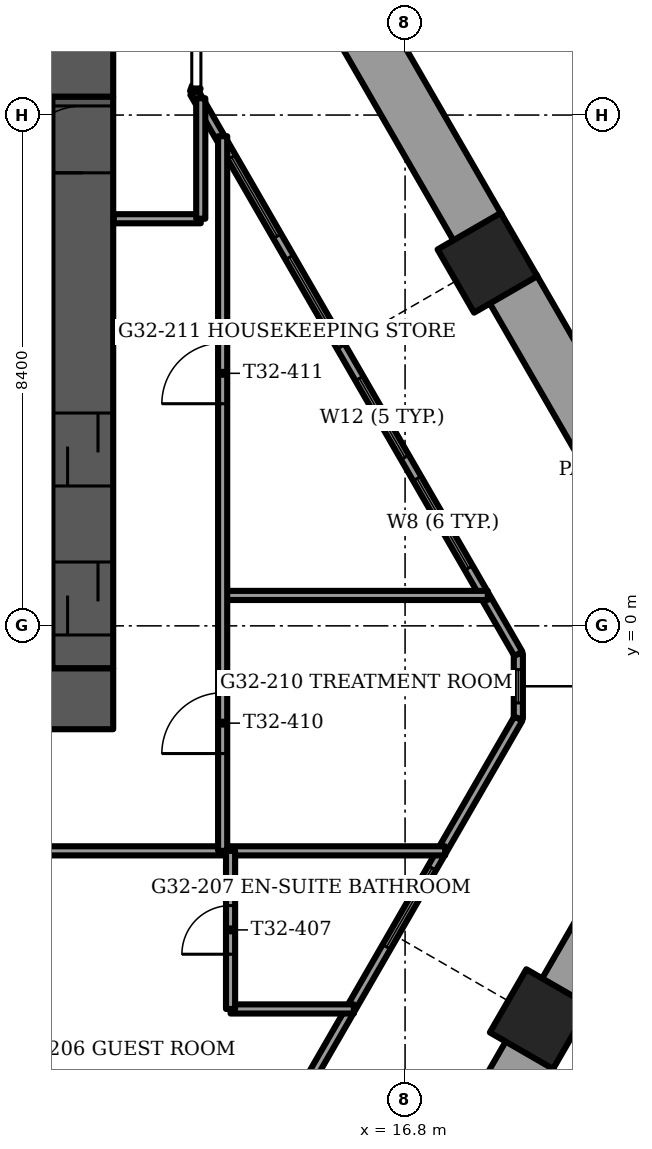
"""IFC4 building model, lengths in metres.
Left out: names, types, materials, properties, quantities, classifications, styles, units other than length and angle.
Written with IfcOpenShell. Run it as: python <this file> out.ifc"""

import sys

from ifc_helpers import new_model, si_unit, direction, frame, frame_2d, origin, origin_2d, place, context, subcontext, project, spatial, rectangle, extrude, element, fill, save


model = new_model("IFC4")
c1 = context("Model", 3, precision=1e-05, world=origin(), true_north=direction((0.0, 1.0)))
c2 = subcontext(c1, "Body", "Model", "MODEL_VIEW")
j1 = project(units=[si_unit("LENGTHUNIT", "METRE"), si_unit("PLANEANGLEUNIT", "RADIAN")], contexts=[c1])
p1 = place(None, origin())
s1 = spatial("IfcSite", under=j1, at=p1, CompositionType="ELEMENT")
p2 = place(p1, origin())
s2 = spatial("IfcBuilding", under=s1, at=p2, CompositionType="ELEMENT")
p3 = place(p2, frame((0.0, 0.0, 131.0)))
s3 = spatial("IfcBuildingStorey", under=s2, at=p3, CompositionType="ELEMENT", Elevation=131.0)
for number, where, z_axis, x_axis in (
    (1, (19.014, -6.467, -1.2), (0.0, 0.0, 1.0), (-0.5, -0.866, 0.0)),
    (2, (18.154, 5.97, -1.2), (0.0, 0.0, 1.0), (0.5, -0.866, 0.0)),
):
    element("IfcColumn", number, at=place(p3, frame(where, z_axis=z_axis, x_axis=x_axis)), inside=s3, PredefinedType="COLUMN", context=c2, shape_type="SweptSolid", body=[
        extrude(rectangle(XDim=1.2, YDim=1.2, at=origin_2d()), origin(), (0.0, 0.0, 1.0), 3.75),
    ])
p4 = place(p3, frame((-12.0, -1.2, -0.3), z_axis=(0.0, 0.0, 1.0), x_axis=(1.0, 0.0, 0.0)))
e3 = element("IfcWall", 3, at=p4, inside=s3, PredefinedType="SHEAR", context=c2, shape_type="SweptSolid", body=[
    extrude(rectangle(XDim=24.0, YDim=1.0, at=frame_2d((12.0, 0.0))), origin(), (0.0, 0.0, 1.0), 3.75),
])
p5 = place(p4, frame((11.2, 0.0, 0.0)))
e4 = element("IfcOpeningElement", 4, at=p5, cuts=e3, PredefinedType="OPENING", context=c2, shape_type="SweptSolid", body=[
    extrude(rectangle(XDim=1.6, YDim=2.1, at=frame_2d((0.8, 1.05))), frame((0.0, 0.5, 0.0), z_axis=(0.0, -1.0, 0.0), x_axis=(1.0, 0.0, 0.0)), (0.0, 0.0, 1.0), 1.0),
])
p6 = place(p3, frame((-12.0, 9.2, -0.3), z_axis=(0.0, 0.0, 1.0), x_axis=(1.0, 0.0, 0.0)))
e5 = element("IfcWall", 5, at=p6, inside=s3, PredefinedType="SHEAR", context=c2, shape_type="SweptSolid", body=[
    extrude(rectangle(XDim=24.0, YDim=1.0, at=frame_2d((12.0, 0.0))), origin(), (0.0, 0.0, 1.0), 3.75),
])
p7 = place(p6, frame((11.2, 0.0, 0.0)))
e6 = element("IfcOpeningElement", 6, at=p7, cuts=e5, PredefinedType="OPENING", context=c2, shape_type="SweptSolid", body=[
    extrude(rectangle(XDim=1.6, YDim=2.1, at=frame_2d((0.8, 1.05))), frame((0.0, 0.5, 0.0), z_axis=(0.0, -1.0, 0.0), x_axis=(1.0, 0.0, 0.0)), (0.0, 0.0, 1.0), 1.0),
])
p8 = place(p6, frame((5.25, 0.0, 0.0)))
e7 = element("IfcOpeningElement", 7, at=p8, cuts=e5, PredefinedType="OPENING", context=c2, shape_type="SweptSolid", body=[
    extrude(rectangle(XDim=1.1, YDim=2.1, at=frame_2d((0.55, 1.05))), frame((0.0, 0.5, 0.0), z_axis=(0.0, -1.0, 0.0), x_axis=(1.0, 0.0, 0.0)), (0.0, 0.0, 1.0), 1.0),
])
p9 = place(p6, frame((17.65, 0.0, 0.0)))
e8 = element("IfcOpeningElement", 8, at=p9, cuts=e5, PredefinedType="OPENING", context=c2, shape_type="SweptSolid", body=[
    extrude(rectangle(XDim=1.1, YDim=2.1, at=frame_2d((0.55, 1.05))), frame((0.0, 0.5, 0.0), z_axis=(0.0, -1.0, 0.0), x_axis=(1.0, 0.0, 0.0)), (0.0, 0.0, 1.0), 1.0),
])
p10 = place(p3, frame((11.5, -0.7, -0.3), z_axis=(0.0, 0.0, 1.0), x_axis=(0.0, 1.0, 0.0)))
e9 = element("IfcWall", 9, at=p10, inside=s3, PredefinedType="SHEAR", context=c2, shape_type="SweptSolid", body=[
    extrude(rectangle(XDim=9.4, YDim=1.0, at=frame_2d((4.7, 0.0))), origin(), (0.0, 0.0, 1.0), 3.75),
])
p11 = place(p10, frame((8.15, 0.0, 0.0)))
e10 = element("IfcOpeningElement", 10, at=p11, cuts=e9, PredefinedType="OPENING", context=c2, shape_type="SweptSolid", body=[
    extrude(rectangle(XDim=1.1, YDim=2.1, at=frame_2d((0.55, 1.05))), frame((0.0, 0.5, 0.0), z_axis=(0.0, -1.0, 0.0), x_axis=(1.0, 0.0, 0.0)), (0.0, 0.0, 1.0), 1.0),
])
p12 = place(p10, frame((0.55, 0.0, 0.0)))
e11 = element("IfcOpeningElement", 11, at=p12, cuts=e9, PredefinedType="OPENING", context=c2, shape_type="SweptSolid", body=[
    extrude(rectangle(XDim=1.2, YDim=2.1, at=frame_2d((0.6, 1.05))), frame((0.0, 0.5, 0.0), z_axis=(0.0, -1.0, 0.0), x_axis=(1.0, 0.0, 0.0)), (0.0, 0.0, 1.0), 1.0),
])
p13 = place(p10, frame((3.0, 0.0, 0.0)))
e12 = element("IfcOpeningElement", 12, at=p13, cuts=e9, PredefinedType="OPENING", context=c2, shape_type="SweptSolid", body=[
    extrude(rectangle(XDim=1.2, YDim=2.1, at=frame_2d((0.6, 1.05))), frame((0.0, 0.5, 0.0), z_axis=(0.0, -1.0, 0.0), x_axis=(1.0, 0.0, 0.0)), (0.0, 0.0, 1.0), 1.0),
])
p14 = place(p3, frame((15.522, -12.815, 0.0), z_axis=(0.0, 0.0, 1.0), x_axis=(0.499999023957, 0.866025967302, 0.0)))
e13 = element("IfcWall", 13, at=p14, inside=s3, PredefinedType="PARAPET", context=c2, shape_type="SweptSolid", body=[
    extrude(rectangle(XDim=6.673, YDim=0.9, at=frame_2d((3.337, 0.0))), origin(), (0.0, 0.0, 1.0), 1.1),
])
p15 = place(p3, frame((19.429, -6.048, 0.0), z_axis=(0.0, 0.0, 1.0), x_axis=(0.499996813733, 0.866027243369, 0.0)))
e14 = element("IfcWall", 14, at=p15, inside=s3, PredefinedType="PARAPET", context=c2, shape_type="SweptSolid", body=[
    extrude(rectangle(XDim=5.187, YDim=0.9, at=frame_2d((2.593, 0.0))), origin(), (0.0, 0.0, 1.0), 1.1),
])
p16 = place(p3, frame((22.022, -0.429, 0.0), z_axis=(0.0, 0.0, 1.0), x_axis=(-0.500017246033, 0.866015446554, 0.0)))
e15 = element("IfcWall", 15, at=p16, inside=s3, PredefinedType="PARAPET", context=c2, shape_type="SweptSolid", body=[
    extrude(rectangle(XDim=6.906, YDim=0.9, at=frame_2d((3.453, 0.0))), origin(), (0.0, 0.0, 1.0), 1.1),
])
p17 = place(p3, frame((17.999, 6.539, 0.0), z_axis=(0.0, 0.0, 1.0), x_axis=(-0.50001062018, 0.866019272134, 0.0)))
e16 = element("IfcWall", 16, at=p17, inside=s3, PredefinedType="PARAPET", context=c2, shape_type="SweptSolid", body=[
    extrude(rectangle(XDim=6.674, YDim=0.9, at=frame_2d((3.337, 0.0))), origin(), (0.0, 0.0, 1.0), 1.1),
])
p18 = place(p3, frame((13.334, -10.755, 0.0), z_axis=(0.0, 0.0, 1.0), x_axis=(0.499997430087, 0.866026887519, 0.0)))
e17 = element("IfcWall", 17, at=p18, inside=s3, PredefinedType="SOLIDWALL", context=c2, shape_type="SweptSolid", body=[
    extrude(rectangle(XDim=10.657, YDim=0.15, at=frame_2d((5.329, 0.0))), origin(), (0.0, 0.0, 1.0), 3.45),
])
p19 = place(p18, frame((0.847, 0.0, 0.15)))
e18 = element("IfcOpeningElement", 18, at=p19, cuts=e17, PredefinedType="OPENING", context=c2, shape_type="SweptSolid", body=[
    extrude(rectangle(XDim=1.7, YDim=2.2, at=frame_2d((0.85, 1.1))), frame((0.0, 0.075, 0.0), z_axis=(0.0, -1.0, 0.0), x_axis=(1.0, 0.0, 0.0)), (0.0, 0.0, 1.0), 0.15),
])
p20 = place(p18, frame((6.322, 0.0, 0.15)))
e19 = element("IfcOpeningElement", 19, at=p20, cuts=e17, PredefinedType="OPENING", context=c2, shape_type="SweptSolid", body=[
    extrude(rectangle(XDim=1.5, YDim=2.2, at=frame_2d((0.75, 1.1))), frame((0.0, 0.075, 0.0), z_axis=(0.0, -1.0, 0.0), x_axis=(1.0, 0.0, 0.0)), (0.0, 0.0, 1.0), 0.15),
])
p21 = place(p3, frame((18.663, -0.46, 0.0), z_axis=(0.0, 0.0, 1.0), x_axis=(-0.499997430087, 0.866026887519, 0.0)))
e20 = element("IfcWall", 20, at=p21, inside=s3, PredefinedType="SOLIDWALL", context=c2, shape_type="SweptSolid", body=[
    extrude(rectangle(XDim=10.657, YDim=0.15, at=frame_2d((5.329, 0.0))), origin(), (0.0, 0.0, 1.0), 3.45),
])
p22 = place(p21, frame((1.63, 0.0, 0.15)))
e21 = element("IfcOpeningElement", 21, at=p22, cuts=e20, PredefinedType="OPENING", context=c2, shape_type="SweptSolid", body=[
    extrude(rectangle(XDim=1.7, YDim=2.2, at=frame_2d((0.85, 1.1))), frame((0.0, 0.075, 0.0), z_axis=(0.0, -1.0, 0.0), x_axis=(1.0, 0.0, 0.0)), (0.0, 0.0, 1.0), 0.15),
])
p23 = place(p21, frame((3.73, 0.0, 0.15)))
e22 = element("IfcOpeningElement", 22, at=p23, cuts=e20, PredefinedType="OPENING", context=c2, shape_type="SweptSolid", body=[
    extrude(rectangle(XDim=1.5, YDim=2.2, at=frame_2d((0.75, 1.1))), frame((0.0, 0.075, 0.0), z_axis=(0.0, -1.0, 0.0), x_axis=(1.0, 0.0, 0.0)), (0.0, 0.0, 1.0), 0.15),
])
p24 = place(p21, frame((5.83, 0.0, 0.15)))
e23 = element("IfcOpeningElement", 23, at=p24, cuts=e20, PredefinedType="OPENING", context=c2, shape_type="SweptSolid", body=[
    extrude(rectangle(XDim=1.7, YDim=2.2, at=frame_2d((0.85, 1.1))), frame((0.0, 0.075, 0.0), z_axis=(0.0, -1.0, 0.0), x_axis=(1.0, 0.0, 0.0)), (0.0, 0.0, 1.0), 0.15),
])
p25 = place(p21, frame((7.93, 0.0, 0.15)))
e24 = element("IfcOpeningElement", 24, at=p25, cuts=e20, PredefinedType="OPENING", context=c2, shape_type="SweptSolid", body=[
    extrude(rectangle(XDim=1.5, YDim=2.2, at=frame_2d((0.75, 1.1))), frame((0.0, 0.075, 0.0), z_axis=(0.0, -1.0, 0.0), x_axis=(1.0, 0.0, 0.0)), (0.0, 0.0, 1.0), 0.15),
])
p26 = place(p3, frame((18.663, -1.525, 0.0), z_axis=(0.0, 0.0, 1.0), x_axis=(0.0, 1.0, 0.0)))
e25 = element("IfcWall", 25, at=p26, inside=s3, PredefinedType="SOLIDWALL", context=c2, shape_type="SweptSolid", body=[
    extrude(rectangle(XDim=1.065, YDim=0.15, at=frame_2d((0.533, 0.0))), origin(), (0.0, 0.0, 1.0), 3.45),
])
p27 = place(p26, frame((0.258, 0.0, 0.15)))
e26 = element("IfcOpeningElement", 26, at=p27, cuts=e25, PredefinedType="OPENING", context=c2, shape_type="SweptSolid", body=[
    extrude(rectangle(XDim=0.55, YDim=2.2, at=frame_2d((0.275, 1.1))), frame((0.0, 0.075, 0.0), z_axis=(0.0, -1.0, 0.0), x_axis=(1.0, 0.0, 0.0)), (0.0, 0.0, 1.0), 0.15),
])
p28 = place(p3, frame((13.334, 8.769, 0.0), z_axis=(0.0, 0.0, 1.0), x_axis=(0.337751931921, 0.941235163221, 0.0)))
e27 = element("IfcWall", 27, at=p28, inside=s3, PredefinedType="SOLIDWALL", context=c2, shape_type="SweptSolid", body=[
    extrude(rectangle(XDim=0.098, YDim=0.15, at=frame_2d((0.049, 0.0))), origin(), (0.0, 0.0, 1.0), 3.45),
])
p29 = place(p3, frame((13.93, -6.3, 0.0), z_axis=(0.0, 0.0, 1.0), x_axis=(1.0, 0.0, 0.0)))
e28 = element("IfcWall", 28, at=p29, inside=s3, PredefinedType="PARTITIONING", context=c2, shape_type="SweptSolid", body=[
    extrude(rectangle(XDim=2.028, YDim=0.15, at=frame_2d((1.014, 0.0))), origin(), (0.0, 0.0, 1.0), 3.45),
])
p30 = place(p3, frame((9.16, -3.7, 0.0), z_axis=(0.0, 0.0, 1.0), x_axis=(1.0, 0.0, 0.0)))
e29 = element("IfcWall", 29, at=p30, inside=s3, PredefinedType="PARTITIONING", context=c2, shape_type="SweptSolid", body=[
    extrude(rectangle(XDim=8.299, YDim=0.15, at=frame_2d((4.149, 0.0))), origin(), (0.0, 0.0, 1.0), 3.45),
])
p31 = place(p30, frame((0.24, 0.0, 0.0)))
e30 = element("IfcOpeningElement", 30, at=p31, cuts=e29, PredefinedType="OPENING", context=c2, shape_type="SweptSolid", body=[
    extrude(rectangle(XDim=1.0, YDim=2.1, at=frame_2d((0.5, 1.05))), frame((0.0, 0.075, 0.0), z_axis=(0.0, -1.0, 0.0), x_axis=(1.0, 0.0, 0.0)), (0.0, 0.0, 1.0), 0.15),
])
p32 = place(p3, frame((13.8, 0.5, 0.0), z_axis=(0.0, 0.0, 1.0), x_axis=(1.0, 0.0, 0.0)))
e31 = element("IfcWall", 31, at=p32, inside=s3, PredefinedType="PARTITIONING", context=c2, shape_type="SweptSolid", body=[
    extrude(rectangle(XDim=4.36, YDim=0.15, at=frame_2d((2.18, 0.0))), origin(), (0.0, 0.0, 1.0), 3.45),
])
p33 = place(p3, frame((12.01, 6.695, 0.0), z_axis=(0.0, 0.0, 1.0), x_axis=(1.0, 0.0, 0.0)))
e32 = element("IfcWall", 32, at=p33, inside=s3, PredefinedType="PARTITIONING", context=c2, shape_type="SweptSolid", body=[
    extrude(rectangle(XDim=1.43, YDim=0.15, at=frame_2d((0.715, 0.0))), origin(), (0.0, 0.0, 1.0), 3.45),
])
p34 = place(p3, frame((13.93, -6.3, 0.0), z_axis=(0.0, 0.0, 1.0), x_axis=(0.0, 1.0, 0.0)))
e33 = element("IfcWall", 33, at=p34, inside=s3, PredefinedType="PARTITIONING", context=c2, shape_type="SweptSolid", body=[
    extrude(rectangle(XDim=2.6, YDim=0.15, at=frame_2d((1.3, 0.0))), origin(), (0.0, 0.0, 1.0), 3.45),
])
p35 = place(p34, frame((0.9, 0.0, 0.0)))
e34 = element("IfcOpeningElement", 34, at=p35, cuts=e33, PredefinedType="OPENING", context=c2, shape_type="SweptSolid", body=[
    extrude(rectangle(XDim=0.8, YDim=2.1, at=frame_2d((0.4, 1.05))), frame((0.0, 0.075, 0.0), z_axis=(0.0, -1.0, 0.0), x_axis=(1.0, 0.0, 0.0)), (0.0, 0.0, 1.0), 0.15),
])
p36 = place(p3, frame((13.8, -3.7, 0.0), z_axis=(0.0, 0.0, 1.0), x_axis=(0.0, 1.0, 0.0)))
e35 = element("IfcWall", 35, at=p36, inside=s3, PredefinedType="PARTITIONING", context=c2, shape_type="SweptSolid", body=[
    extrude(rectangle(XDim=11.752, YDim=0.15, at=frame_2d((5.876, 0.0))), origin(), (0.0, 0.0, 1.0), 3.45),
])
p37 = place(p36, frame((1.6, 0.0, 0.0)))
e36 = element("IfcOpeningElement", 36, at=p37, cuts=e35, PredefinedType="OPENING", context=c2, shape_type="SweptSolid", body=[
    extrude(rectangle(XDim=1.0, YDim=2.1, at=frame_2d((0.5, 1.05))), frame((0.0, 0.075, 0.0), z_axis=(0.0, -1.0, 0.0), x_axis=(1.0, 0.0, 0.0)), (0.0, 0.0, 1.0), 0.15),
])
p38 = place(p36, frame((7.353, 0.0, 0.0)))
e37 = element("IfcOpeningElement", 37, at=p38, cuts=e35, PredefinedType="OPENING", context=c2, shape_type="SweptSolid", body=[
    extrude(rectangle(XDim=1.0, YDim=2.1, at=frame_2d((0.5, 1.05))), frame((0.0, 0.075, 0.0), z_axis=(0.0, -1.0, 0.0), x_axis=(1.0, 0.0, 0.0)), (0.0, 0.0, 1.0), 0.15),
])
p39 = place(p3, frame((13.44, 6.695, 0.0), z_axis=(0.0, 0.0, 1.0), x_axis=(0.0, 1.0, 0.0)))
e38 = element("IfcWall", 38, at=p39, inside=s3, PredefinedType="PARTITIONING", context=c2, shape_type="SweptSolid", body=[
    extrude(rectangle(XDim=1.981, YDim=0.15, at=frame_2d((0.99, 0.0))), origin(), (0.0, 0.0, 1.0), 3.45),
])
p40 = place(p20, origin())
e39 = element("IfcWindow", 39, at=p40, inside=s3, PartitioningType="SINGLE_PANEL", PredefinedType="WINDOW", context=c2, shape_type="SweptSolid", body=[
    extrude(rectangle(XDim=1.5, YDim=2.2, at=frame_2d((0.75, 1.1))), frame((0.0, 0.03, 0.0), z_axis=(0.0, -1.0, 0.0), x_axis=(1.0, 0.0, 0.0)), (0.0, 0.0, 1.0), 0.06),
])
fill(e19, e39)
p41 = place(p22, origin())
e40 = element("IfcWindow", 40, at=p41, inside=s3, PartitioningType="SINGLE_PANEL", PredefinedType="WINDOW", context=c2, shape_type="SweptSolid", body=[
    extrude(rectangle(XDim=1.7, YDim=2.2, at=frame_2d((0.85, 1.1))), frame((0.0, 0.03, 0.0), z_axis=(0.0, -1.0, 0.0), x_axis=(1.0, 0.0, 0.0)), (0.0, 0.0, 1.0), 0.06),
])
fill(e21, e40)
p42 = place(p23, origin())
e41 = element("IfcWindow", 41, at=p42, inside=s3, PartitioningType="SINGLE_PANEL", PredefinedType="WINDOW", context=c2, shape_type="SweptSolid", body=[
    extrude(rectangle(XDim=1.5, YDim=2.2, at=frame_2d((0.75, 1.1))), frame((0.0, 0.03, 0.0), z_axis=(0.0, -1.0, 0.0), x_axis=(1.0, 0.0, 0.0)), (0.0, 0.0, 1.0), 0.06),
])
fill(e22, e41)
p43 = place(p24, origin())
e42 = element("IfcWindow", 42, at=p43, inside=s3, PartitioningType="SINGLE_PANEL", PredefinedType="WINDOW", context=c2, shape_type="SweptSolid", body=[
    extrude(rectangle(XDim=1.7, YDim=2.2, at=frame_2d((0.85, 1.1))), frame((0.0, 0.03, 0.0), z_axis=(0.0, -1.0, 0.0), x_axis=(1.0, 0.0, 0.0)), (0.0, 0.0, 1.0), 0.06),
])
fill(e23, e42)
p44 = place(p25, origin())
e43 = element("IfcWindow", 43, at=p44, inside=s3, PartitioningType="SINGLE_PANEL", PredefinedType="WINDOW", context=c2, shape_type="SweptSolid", body=[
    extrude(rectangle(XDim=1.5, YDim=2.2, at=frame_2d((0.75, 1.1))), frame((0.0, 0.03, 0.0), z_axis=(0.0, -1.0, 0.0), x_axis=(1.0, 0.0, 0.0)), (0.0, 0.0, 1.0), 0.06),
])
fill(e24, e43)
p45 = place(p27, origin())
e44 = element("IfcWindow", 44, at=p45, inside=s3, PartitioningType="SINGLE_PANEL", PredefinedType="WINDOW", context=c2, shape_type="SweptSolid", body=[
    extrude(rectangle(XDim=0.55, YDim=2.2, at=frame_2d((0.275, 1.1))), frame((0.0, 0.03, 0.0), z_axis=(0.0, -1.0, 0.0), x_axis=(1.0, 0.0, 0.0)), (0.0, 0.0, 1.0), 0.06),
])
fill(e26, e44)
p46 = place(p11, origin())
e45 = element("IfcDoor", 45, at=p46, inside=s3, OperationType="SINGLE_SWING_RIGHT", PredefinedType="DOOR", context=c2, shape_type="SweptSolid", body=[
    extrude(rectangle(XDim=1.1, YDim=2.1, at=frame_2d((0.55, 1.05))), frame((0.0, 0.025, 0.0), z_axis=(0.0, -1.0, 0.0), x_axis=(1.0, 0.0, 0.0)), (0.0, 0.0, 1.0), 0.05),
])
fill(e10, e45)
p47 = place(p12, origin())
e46 = element("IfcDoor", 46, at=p47, inside=s3, OperationType="SLIDING_TO_LEFT", PredefinedType="DOOR", context=c2, shape_type="SweptSolid", body=[
    extrude(rectangle(XDim=1.2, YDim=2.1, at=frame_2d((0.6, 1.05))), frame((0.0, 0.025, 0.0), z_axis=(0.0, -1.0, 0.0), x_axis=(1.0, 0.0, 0.0)), (0.0, 0.0, 1.0), 0.05),
])
fill(e11, e46)
p48 = place(p13, origin())
e47 = element("IfcDoor", 47, at=p48, inside=s3, OperationType="SLIDING_TO_LEFT", PredefinedType="DOOR", context=c2, shape_type="SweptSolid", body=[
    extrude(rectangle(XDim=1.2, YDim=2.1, at=frame_2d((0.6, 1.05))), frame((0.0, 0.025, 0.0), z_axis=(0.0, -1.0, 0.0), x_axis=(1.0, 0.0, 0.0)), (0.0, 0.0, 1.0), 0.05),
])
fill(e12, e47)
p49 = place(p35, origin())
e48 = element("IfcDoor", 48, at=p49, inside=s3, OperationType="SINGLE_SWING_RIGHT", PredefinedType="DOOR", context=c2, shape_type="SweptSolid", body=[
    extrude(rectangle(XDim=0.8, YDim=2.1, at=frame_2d((0.4, 1.05))), frame((0.0, 0.025, 0.0), z_axis=(0.0, -1.0, 0.0), x_axis=(1.0, 0.0, 0.0)), (0.0, 0.0, 1.0), 0.05),
])
fill(e34, e48)
p50 = place(p37, origin())
e49 = element("IfcDoor", 49, at=p50, inside=s3, OperationType="SINGLE_SWING_LEFT", PredefinedType="DOOR", context=c2, shape_type="SweptSolid", body=[
    extrude(rectangle(XDim=1.0, YDim=2.1, at=frame_2d((0.5, 1.05))), frame((0.0, 0.025, 0.0), z_axis=(0.0, -1.0, 0.0), x_axis=(1.0, 0.0, 0.0)), (0.0, 0.0, 1.0), 0.05),
])
fill(e36, e49)
p51 = place(p38, origin())
e50 = element("IfcDoor", 50, at=p51, inside=s3, OperationType="SINGLE_SWING_LEFT", PredefinedType="DOOR", context=c2, shape_type="SweptSolid", body=[
    extrude(rectangle(XDim=1.0, YDim=2.1, at=frame_2d((0.5, 1.05))), frame((0.0, 0.025, 0.0), z_axis=(0.0, -1.0, 0.0), x_axis=(1.0, 0.0, 0.0)), (0.0, 0.0, 1.0), 0.05),
])
fill(e37, e50)
save(model, sys.argv[1])
